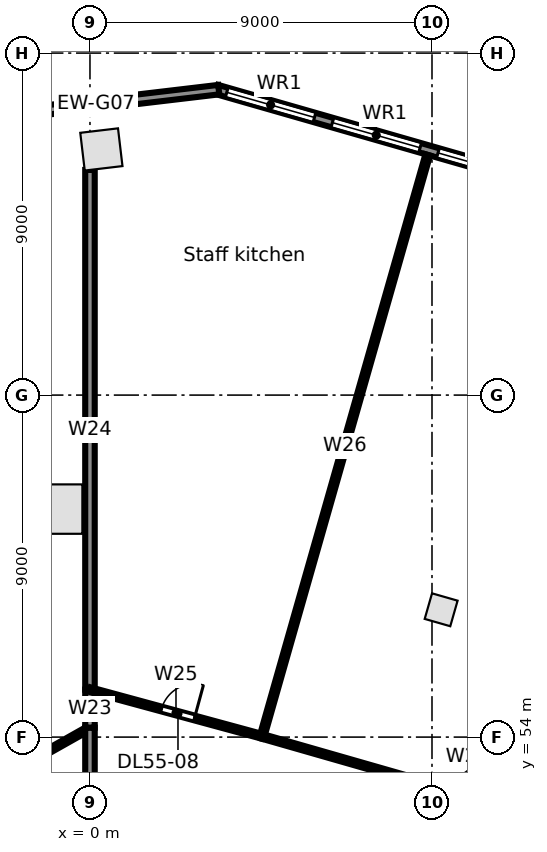
"""IFC4 building model, lengths in metres.
Left out: names, types, materials, properties, quantities, classifications, styles, units other than length and angle.
Written with IfcOpenShell. Run it as: python <this file> out.ifc"""

import sys

from ifc_helpers import new_model, si_unit, direction, frame, frame_2d, origin, origin_2d, place, context, subcontext, project, spatial, rectangle, extrude, element, fill, save


model = new_model("IFC4")
c1 = context("Model", 3, precision=1e-05, world=origin(), true_north=direction((0.0, 1.0)))
c2 = subcontext(c1, "Body", "Model", "MODEL_VIEW")
j1 = project(units=[si_unit("LENGTHUNIT", "METRE"), si_unit("PLANEANGLEUNIT", "RADIAN")], contexts=[c1])
p1 = place(None, origin())
s1 = spatial("IfcSite", under=j1, at=p1, CompositionType="ELEMENT")
p2 = place(p1, origin())
s2 = spatial("IfcBuilding", under=s1, at=p2, CompositionType="ELEMENT")
p3 = place(p2, frame((0.0, 0.0, 254.3)))
s3 = spatial("IfcBuildingStorey", under=s2, at=p3, CompositionType="ELEMENT", Elevation=254.3)
p4 = place(p3, frame((0.3, 69.464, 0.0), z_axis=(0.0, 0.0, 1.0), x_axis=(-0.993068456955, -0.117537397458, 0.0)))
e1 = element("IfcColumn", 1, at=p4, inside=s3, PredefinedType="COLUMN", context=c2, shape_type="SweptSolid", body=[
    extrude(rectangle(XDim=1.0, YDim=1.0, at=origin_2d()), origin(), (0.0, 0.0, 1.0), 3.9),
])
p5 = place(p3, frame((-0.85, 60.0, 0.0), z_axis=(0.0, 0.0, 1.0), x_axis=(0.0, 1.0, 0.0)))
e2 = element("IfcColumn", 2, at=p5, inside=s3, PredefinedType="COLUMN", context=c2, shape_type="SweptSolid", body=[
    extrude(rectangle(XDim=1.3, YDim=1.3, at=origin_2d()), origin(), (0.0, 0.0, 1.0), 3.9),
])
p6 = place(p3, frame((9.241, 57.35, 0.0), z_axis=(0.0, 0.0, 1.0), x_axis=(0.961261695938, -0.275637355817, 0.0)))
e3 = element("IfcColumn", 3, at=p6, inside=s3, PredefinedType="COLUMN", context=c2, shape_type="SweptSolid", body=[
    extrude(rectangle(XDim=0.7, YDim=0.7, at=origin_2d()), origin(), (0.0, 0.0, 1.0), 3.9),
])
p7 = place(p3, frame((3.34, 71.042, 0.0), z_axis=(0.0, 0.0, 1.0), x_axis=(0.96126179431, -0.275637012753, 0.0)))
e4 = element("IfcWall", 4, at=p7, inside=s3, PredefinedType="STANDARD", context=c2, shape_type="SweptSolid", body=[
    extrude(rectangle(XDim=34.779, YDim=0.25, at=frame_2d((17.39, 0.0))), origin(), (0.0, 0.0, 1.0), 3.55),
])
p8 = place(p7, frame((32.071, 0.0, 0.8)))
e5 = element("IfcOpeningElement", 5, at=p8, cuts=e4, PredefinedType="OPENING", context=c2, shape_type="SweptSolid", body=[
    extrude(rectangle(XDim=2.4, YDim=2.2, at=frame_2d((1.2, 1.1))), frame((0.0, 0.135, 0.0), z_axis=(0.0, -1.0, 0.0), x_axis=(1.0, 0.0, 0.0)), (0.0, 0.0, 1.0), 0.27),
])
p9 = place(p7, frame((29.18, 0.0, 0.8)))
e6 = element("IfcOpeningElement", 6, at=p9, cuts=e4, PredefinedType="OPENING", context=c2, shape_type="SweptSolid", body=[
    extrude(rectangle(XDim=2.4, YDim=2.2, at=frame_2d((1.2, 1.1))), frame((0.0, 0.135, 0.0), z_axis=(0.0, -1.0, 0.0), x_axis=(1.0, 0.0, 0.0)), (0.0, 0.0, 1.0), 0.27),
])
p10 = place(p7, frame((26.289, 0.0, 0.8)))
e7 = element("IfcOpeningElement", 7, at=p10, cuts=e4, PredefinedType="OPENING", context=c2, shape_type="SweptSolid", body=[
    extrude(rectangle(XDim=2.4, YDim=2.2, at=frame_2d((1.2, 1.1))), frame((0.0, 0.135, 0.0), z_axis=(0.0, -1.0, 0.0), x_axis=(1.0, 0.0, 0.0)), (0.0, 0.0, 1.0), 0.27),
])
p11 = place(p7, frame((23.398, 0.0, 0.8)))
e8 = element("IfcOpeningElement", 8, at=p11, cuts=e4, PredefinedType="OPENING", context=c2, shape_type="SweptSolid", body=[
    extrude(rectangle(XDim=2.4, YDim=2.2, at=frame_2d((1.2, 1.1))), frame((0.0, 0.135, 0.0), z_axis=(0.0, -1.0, 0.0), x_axis=(1.0, 0.0, 0.0)), (0.0, 0.0, 1.0), 0.27),
])
p12 = place(p7, frame((20.508, 0.0, 0.8)))
e9 = element("IfcOpeningElement", 9, at=p12, cuts=e4, PredefinedType="OPENING", context=c2, shape_type="SweptSolid", body=[
    extrude(rectangle(XDim=2.4, YDim=2.2, at=frame_2d((1.2, 1.1))), frame((0.0, 0.135, 0.0), z_axis=(0.0, -1.0, 0.0), x_axis=(1.0, 0.0, 0.0)), (0.0, 0.0, 1.0), 0.27),
])
p13 = place(p7, frame((17.616, 0.0, 0.8)))
e10 = element("IfcOpeningElement", 10, at=p13, cuts=e4, PredefinedType="OPENING", context=c2, shape_type="SweptSolid", body=[
    extrude(rectangle(XDim=2.4, YDim=2.2, at=frame_2d((1.2, 1.1))), frame((0.0, 0.135, 0.0), z_axis=(0.0, -1.0, 0.0), x_axis=(1.0, 0.0, 0.0)), (0.0, 0.0, 1.0), 0.27),
])
p14 = place(p7, frame((14.726, 0.0, 0.8)))
e11 = element("IfcOpeningElement", 11, at=p14, cuts=e4, PredefinedType="OPENING", context=c2, shape_type="SweptSolid", body=[
    extrude(rectangle(XDim=2.4, YDim=2.2, at=frame_2d((1.2, 1.1))), frame((0.0, 0.135, 0.0), z_axis=(0.0, -1.0, 0.0), x_axis=(1.0, 0.0, 0.0)), (0.0, 0.0, 1.0), 0.27),
])
p15 = place(p7, frame((11.834, 0.0, 0.8)))
e12 = element("IfcOpeningElement", 12, at=p15, cuts=e4, PredefinedType="OPENING", context=c2, shape_type="SweptSolid", body=[
    extrude(rectangle(XDim=2.4, YDim=2.2, at=frame_2d((1.2, 1.1))), frame((0.0, 0.135, 0.0), z_axis=(0.0, -1.0, 0.0), x_axis=(1.0, 0.0, 0.0)), (0.0, 0.0, 1.0), 0.27),
])
p16 = place(p7, frame((8.944, 0.0, 0.8)))
e13 = element("IfcOpeningElement", 13, at=p16, cuts=e4, PredefinedType="OPENING", context=c2, shape_type="SweptSolid", body=[
    extrude(rectangle(XDim=2.4, YDim=2.2, at=frame_2d((1.2, 1.1))), frame((0.0, 0.135, 0.0), z_axis=(0.0, -1.0, 0.0), x_axis=(1.0, 0.0, 0.0)), (0.0, 0.0, 1.0), 0.27),
])
p17 = place(p7, frame((6.052, 0.0, 0.8)))
e14 = element("IfcOpeningElement", 14, at=p17, cuts=e4, PredefinedType="OPENING", context=c2, shape_type="SweptSolid", body=[
    extrude(rectangle(XDim=2.4, YDim=2.2, at=frame_2d((1.2, 1.1))), frame((0.0, 0.135, 0.0), z_axis=(0.0, -1.0, 0.0), x_axis=(1.0, 0.0, 0.0)), (0.0, 0.0, 1.0), 0.27),
])
p18 = place(p7, frame((3.162, 0.0, 0.8)))
e15 = element("IfcOpeningElement", 15, at=p18, cuts=e4, PredefinedType="OPENING", context=c2, shape_type="SweptSolid", body=[
    extrude(rectangle(XDim=2.4, YDim=2.2, at=frame_2d((1.2, 1.1))), frame((0.0, 0.135, 0.0), z_axis=(0.0, -1.0, 0.0), x_axis=(1.0, 0.0, 0.0)), (0.0, 0.0, 1.0), 0.27),
])
p19 = place(p7, frame((0.271, 0.0, 0.8)))
e16 = element("IfcOpeningElement", 16, at=p19, cuts=e4, PredefinedType="OPENING", context=c2, shape_type="SweptSolid", body=[
    extrude(rectangle(XDim=2.4, YDim=2.2, at=frame_2d((1.2, 1.1))), frame((0.0, 0.135, 0.0), z_axis=(0.0, -1.0, 0.0), x_axis=(1.0, 0.0, 0.0)), (0.0, 0.0, 1.0), 0.27),
])
p20 = place(p3, frame((-3.071, 70.273, 0.0), z_axis=(0.0, 0.0, 1.0), x_axis=(0.993064524962, 0.11757061394, 0.0)))
e17 = element("IfcWall", 17, at=p20, inside=s3, PredefinedType="STANDARD", context=c2, shape_type="SweptSolid", body=[
    extrude(rectangle(XDim=6.506, YDim=0.25, at=frame_2d((3.253, 0.0))), origin(), (0.0, 0.0, 1.0), 3.55),
])
p21 = place(p3, frame((-3.709, 52.157, 0.0), z_axis=(0.0, 0.0, 1.0), x_axis=(0.870901087888, 0.491458335075, 0.0)))
e18 = element("IfcWall", 18, at=p21, inside=s3, PredefinedType="PARTITIONING", context=c2, shape_type="SweptSolid", body=[
    extrude(rectangle(XDim=4.259, YDim=0.125, at=frame_2d((2.129, 0.0))), origin(), (0.0, 0.0, 1.0), 2.722),
])
p22 = place(p3, frame((0.0, 49.015, 0.0), z_axis=(0.0, 0.0, 1.0), x_axis=(0.0, 1.0, 0.0)))
e19 = element("IfcWall", 19, at=p22, inside=s3, PredefinedType="PARTITIONING", context=c2, shape_type="SweptSolid", body=[
    extrude(rectangle(XDim=5.235, YDim=0.25, at=frame_2d((2.618, 0.0))), origin(), (0.0, 0.0, 1.0), 2.73),
])
p23 = place(p22, frame((1.7, 0.0, 0.0)))
e20 = element("IfcOpeningElement", 20, at=p23, cuts=e19, PredefinedType="OPENING", context=c2, shape_type="SweptSolid", body=[
    extrude(rectangle(XDim=1.8, YDim=2.1, at=frame_2d((0.9, 1.05))), frame((0.0, 0.135, 0.0), z_axis=(0.0, -1.0, 0.0), x_axis=(1.0, 0.0, 0.0)), (0.0, 0.0, 1.0), 0.27),
])
p24 = place(p3, frame((0.0, 54.25, 0.0), z_axis=(0.0, 0.0, 1.0), x_axis=(0.0, 1.0, 0.0)))
e21 = element("IfcWall", 21, at=p24, inside=s3, PredefinedType="PARTITIONING", context=c2, shape_type="SweptSolid", body=[
    extrude(rectangle(XDim=1.0, YDim=0.25, at=frame_2d((0.5, 0.0))), origin(), (0.0, 0.0, 1.0), 3.55),
])
p25 = place(p3, frame((0.0, 55.25, 0.0), z_axis=(0.0, 0.0, 1.0), x_axis=(0.0, 1.0, 0.0)))
e22 = element("IfcWall", 22, at=p25, inside=s3, PredefinedType="PARTITIONING", context=c2, shape_type="SweptSolid", body=[
    extrude(rectangle(XDim=13.675, YDim=0.25, at=frame_2d((6.837, 0.0))), origin(), (0.0, 0.0, 1.0), 2.618),
])
p26 = place(p3, frame((0.0, 55.25, 0.0), z_axis=(0.0, 0.0, 1.0), x_axis=(0.965016778836, -0.262188132005, 0.0)))
e23 = element("IfcWall", 23, at=p26, inside=s3, PredefinedType="PARTITIONING", context=c2, shape_type="SweptSolid", body=[
    extrude(rectangle(XDim=4.691, YDim=0.125, at=frame_2d((2.346, 0.0))), origin(), (0.0, 0.0, 1.0), 3.55),
])
p27 = place(p26, frame((1.95, 0.0, 0.0)))
e24 = element("IfcOpeningElement", 24, at=p27, cuts=e23, PredefinedType="OPENING", context=c2, shape_type="SweptSolid", body=[
    extrude(rectangle(XDim=0.9, YDim=2.1, at=frame_2d((0.45, 1.05))), frame((0.0, 0.073, 0.0), z_axis=(0.0, -1.0, 0.0), x_axis=(1.0, 0.0, 0.0)), (0.0, 0.0, 1.0), 0.145),
])
p28 = place(p3, frame((4.527, 54.02, 0.0), z_axis=(0.0, 0.0, 1.0), x_axis=(0.274088747086, 0.961704402985, 0.0)))
e25 = element("IfcWall", 25, at=p28, inside=s3, PredefinedType="PARTITIONING", context=c2, shape_type="SweptSolid", body=[
    extrude(rectangle(XDim=15.91, YDim=0.125, at=frame_2d((7.955, 0.0))), origin(), (0.0, 0.0, 1.0), 2.618),
])
p29 = place(p3, frame((4.527, 54.02, 0.0), z_axis=(0.0, 0.0, 1.0), x_axis=(0.961279520283, -0.275575187352, 0.0)))
e26 = element("IfcWall", 26, at=p29, inside=s3, PredefinedType="PARTITIONING", context=c2, shape_type="SweptSolid", body=[
    extrude(rectangle(XDim=11.25, YDim=0.125, at=frame_2d((5.625, 0.0))), origin(), (0.0, 0.0, 1.0), 2.618),
])
p30 = place(p29, frame((5.2, 0.0, 0.0)))
e27 = element("IfcOpeningElement", 27, at=p30, cuts=e26, PredefinedType="OPENING", context=c2, shape_type="SweptSolid", body=[
    extrude(rectangle(XDim=0.9, YDim=2.1, at=frame_2d((0.45, 1.05))), frame((0.0, 0.073, 0.0), z_axis=(0.0, -1.0, 0.0), x_axis=(1.0, 0.0, 0.0)), (0.0, 0.0, 1.0), 0.145),
])
p31 = place(p17, origin())
e28 = element("IfcWindow", 28, at=p31, inside=s3, PartitioningType="SINGLE_PANEL", PredefinedType="WINDOW", context=c2, shape_type="SweptSolid", body=[
    extrude(rectangle(XDim=2.4, YDim=2.2, at=frame_2d((1.2, 1.1))), frame((0.0, 0.03, 0.0), z_axis=(0.0, -1.0, 0.0), x_axis=(1.0, 0.0, 0.0)), (0.0, 0.0, 1.0), 0.06),
])
fill(e14, e28)
p32 = place(p18, origin())
e29 = element("IfcWindow", 29, at=p32, inside=s3, PartitioningType="SINGLE_PANEL", PredefinedType="WINDOW", context=c2, shape_type="SweptSolid", body=[
    extrude(rectangle(XDim=2.4, YDim=2.2, at=frame_2d((1.2, 1.1))), frame((0.0, 0.03, 0.0), z_axis=(0.0, -1.0, 0.0), x_axis=(1.0, 0.0, 0.0)), (0.0, 0.0, 1.0), 0.06),
])
fill(e15, e29)
p33 = place(p19, origin())
e30 = element("IfcWindow", 30, at=p33, inside=s3, PartitioningType="SINGLE_PANEL", PredefinedType="WINDOW", context=c2, shape_type="SweptSolid", body=[
    extrude(rectangle(XDim=2.4, YDim=2.2, at=frame_2d((1.2, 1.1))), frame((0.0, 0.03, 0.0), z_axis=(0.0, -1.0, 0.0), x_axis=(1.0, 0.0, 0.0)), (0.0, 0.0, 1.0), 0.06),
])
fill(e16, e30)
p34 = place(p27, origin())
e31 = element("IfcDoor", 31, at=p34, inside=s3, OperationType="SINGLE_SWING_RIGHT", PredefinedType="DOOR", context=c2, shape_type="SweptSolid", body=[
    extrude(rectangle(XDim=0.9, YDim=2.1, at=frame_2d((0.45, 1.05))), frame((0.0, 0.025, 0.0), z_axis=(0.0, -1.0, 0.0), x_axis=(1.0, 0.0, 0.0)), (0.0, 0.0, 1.0), 0.05),
])
fill(e24, e31)
save(model, sys.argv[1])
